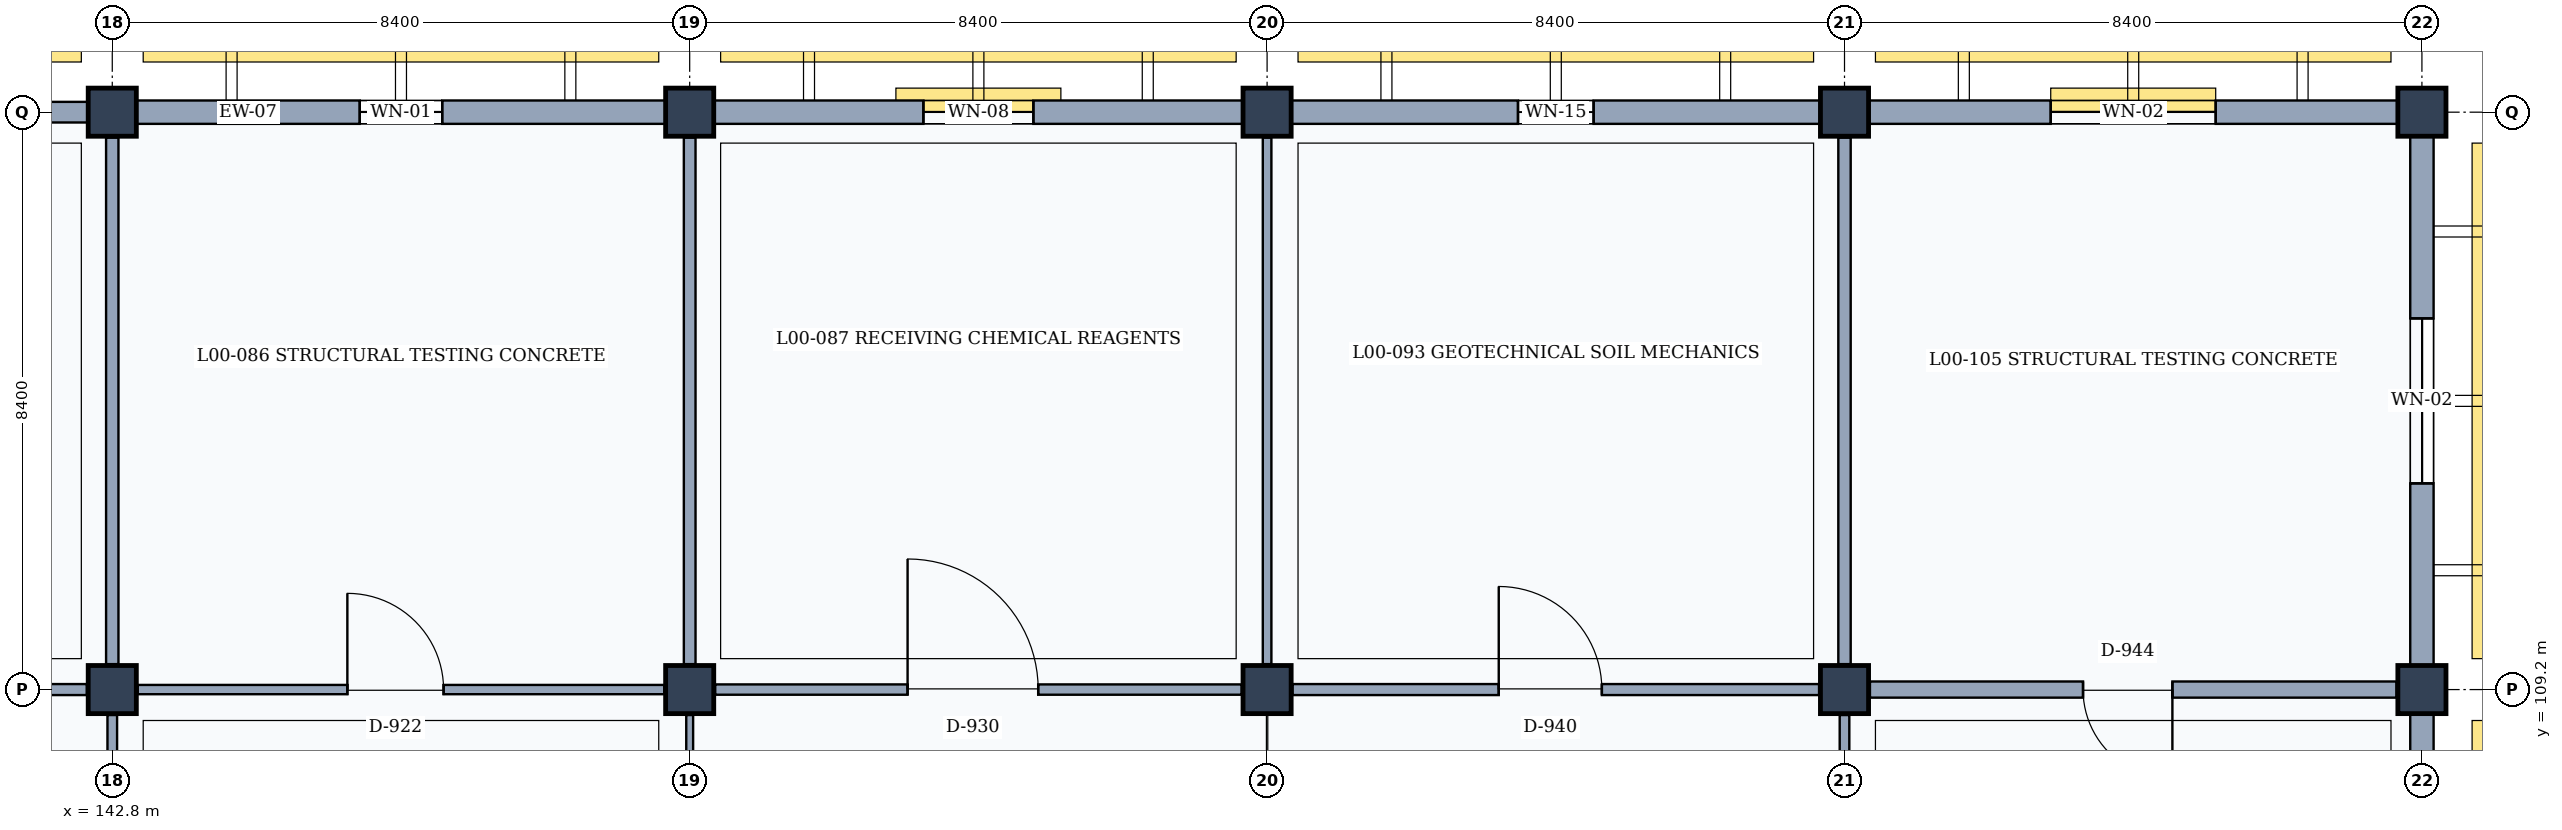
"""IFC4 building model, lengths in metres.
Left out: names, types, materials, properties, quantities, classifications, styles, units other than length and angle.
Written with IfcOpenShell. Run it as: python <this file> out.ifc"""

import sys

from ifc_helpers import new_model, si_unit, direction, frame, frame_2d, origin, origin_2d, place, context, subcontext, project, spatial, rectangle, extrude, element, fill, save


model = new_model("IFC4")
c1 = context("Model", 3, precision=1e-05, world=origin(), true_north=direction((0.0, 1.0)))
c2 = subcontext(c1, "Body", "Model", "MODEL_VIEW")
j1 = project(units=[si_unit("LENGTHUNIT", "METRE"), si_unit("PLANEANGLEUNIT", "RADIAN")], contexts=[c1])
p1 = place(None, origin())
s1 = spatial("IfcSite", under=j1, at=p1, CompositionType="ELEMENT")
p2 = place(p1, origin())
s2 = spatial("IfcBuilding", under=s1, at=p2, CompositionType="ELEMENT")
p3 = place(p2, origin())
s3 = spatial("IfcBuildingStorey", under=s2, at=p3, CompositionType="ELEMENT", Elevation=0.0)
for number, where, z_axis, x_axis in (
    (1, (142.8, 109.2, 0.0), (0.0, 0.0, 1.0), (1.0, 0.0, 0.0)),
    (2, (142.8, 117.6, 0.0), (0.0, 0.0, 1.0), (1.0, 0.0, 0.0)),
    (3, (151.2, 109.2, 0.0), (0.0, 0.0, 1.0), (1.0, 0.0, 0.0)),
    (4, (151.2, 117.6, 0.0), (0.0, 0.0, 1.0), (1.0, 0.0, 0.0)),
    (5, (159.6, 109.2, 0.0), (0.0, 0.0, 1.0), (1.0, 0.0, 0.0)),
    (6, (159.6, 117.6, 0.0), (0.0, 0.0, 1.0), (1.0, 0.0, 0.0)),
    (7, (168.0, 109.2, 0.0), (0.0, 0.0, 1.0), (1.0, 0.0, 0.0)),
    (8, (168.0, 117.6, 0.0), (0.0, 0.0, 1.0), (1.0, 0.0, 0.0)),
    (9, (176.4, 109.2, 0.0), (0.0, 0.0, 1.0), (1.0, 0.0, 0.0)),
    (10, (176.4, 117.6, 0.0), (0.0, 0.0, 1.0), (1.0, 0.0, 0.0)),
):
    element("IfcColumn", number, at=place(p3, frame(where, z_axis=z_axis, x_axis=x_axis)), inside=s3, PredefinedType="COLUMN", context=c2, shape_type="SweptSolid", body=[
        extrude(rectangle(XDim=0.7, YDim=0.7, at=origin_2d()), origin(), (0.0, 0.0, 1.0), 4.8),
    ])
p4 = place(p3, frame((134.7, 117.6, 0.0), z_axis=(0.0, 0.0, 1.0), x_axis=(1.0, 0.0, 0.0)))
e11 = element("IfcWall", 11, at=p4, inside=s3, PredefinedType="SOLIDWALL", context=c2, shape_type="SweptSolid", body=[
    extrude(rectangle(XDim=7.75, YDim=0.3, at=frame_2d((3.875, 0.0))), origin(), (0.0, 0.0, 1.0), 3.96),
])
p5 = place(p4, frame((2.375, 0.0, 0.95)))
e12 = element("IfcOpeningElement", 12, at=p5, cuts=e11, PredefinedType="OPENING", context=c2, shape_type="SweptSolid", body=[
    extrude(rectangle(XDim=3.0, YDim=1.8, at=frame_2d((1.5, 0.9))), frame((0.0, 0.16, 0.0), z_axis=(0.0, -1.0, 0.0), x_axis=(1.0, 0.0, 0.0)), (0.0, 0.0, 1.0), 0.32),
])
p6 = place(p3, frame((143.15, 117.6, 0.0), z_axis=(0.0, 0.0, 1.0), x_axis=(1.0, 0.0, 0.0)))
e13 = element("IfcWall", 13, at=p6, inside=s3, PredefinedType="SOLIDWALL", context=c2, shape_type="SweptSolid", body=[
    extrude(rectangle(XDim=7.7, YDim=0.34, at=frame_2d((3.85, 0.0))), origin(), (0.0, 0.0, 1.0), 3.96),
])
p7 = place(p6, frame((3.25, 0.0, 0.95)))
e14 = element("IfcOpeningElement", 14, at=p7, cuts=e13, PredefinedType="OPENING", context=c2, shape_type="SweptSolid", body=[
    extrude(rectangle(XDim=1.2, YDim=1.8, at=frame_2d((0.6, 0.9))), frame((0.0, 0.18, 0.0), z_axis=(0.0, -1.0, 0.0), x_axis=(1.0, 0.0, 0.0)), (0.0, 0.0, 1.0), 0.36),
])
p8 = place(p3, frame((151.55, 117.6, 0.0), z_axis=(0.0, 0.0, 1.0), x_axis=(1.0, 0.0, 0.0)))
e15 = element("IfcWall", 15, at=p8, inside=s3, PredefinedType="SOLIDWALL", context=c2, shape_type="SweptSolid", body=[
    extrude(rectangle(XDim=7.7, YDim=0.34, at=frame_2d((3.85, 0.0))), origin(), (0.0, 0.0, 1.0), 3.96),
])
p9 = place(p8, frame((3.05, 0.0, 0.95)))
e16 = element("IfcOpeningElement", 16, at=p9, cuts=e15, PredefinedType="OPENING", context=c2, shape_type="SweptSolid", body=[
    extrude(rectangle(XDim=1.6, YDim=2.0, at=frame_2d((0.8, 1.0))), frame((0.0, 0.18, 0.0), z_axis=(0.0, -1.0, 0.0), x_axis=(1.0, 0.0, 0.0)), (0.0, 0.0, 1.0), 0.36),
])
p10 = place(p3, frame((159.95, 117.6, 0.0), z_axis=(0.0, 0.0, 1.0), x_axis=(1.0, 0.0, 0.0)))
e17 = element("IfcWall", 17, at=p10, inside=s3, PredefinedType="SOLIDWALL", context=c2, shape_type="SweptSolid", body=[
    extrude(rectangle(XDim=7.7, YDim=0.34, at=frame_2d((3.85, 0.0))), origin(), (0.0, 0.0, 1.0), 3.96),
])
p11 = place(p10, frame((3.3, 0.0, 0.95)))
e18 = element("IfcOpeningElement", 18, at=p11, cuts=e17, PredefinedType="OPENING", context=c2, shape_type="SweptSolid", body=[
    extrude(rectangle(XDim=1.1, YDim=1.95, at=frame_2d((0.55, 0.975))), frame((0.0, 0.18, 0.0), z_axis=(0.0, -1.0, 0.0), x_axis=(1.0, 0.0, 0.0)), (0.0, 0.0, 1.0), 0.36),
])
p12 = place(p3, frame((176.4, 108.85, 0.0), z_axis=(0.0, 0.0, 1.0), x_axis=(0.0, -1.0, 0.0)))
e19 = element("IfcWall", 19, at=p12, inside=s3, PredefinedType="SOLIDWALL", context=c2, shape_type="SweptSolid", body=[
    extrude(rectangle(XDim=7.7, YDim=0.34, at=frame_2d((3.85, 0.0))), origin(), (0.0, 0.0, 1.0), 3.96),
])
p13 = place(p12, frame((3.25, 0.0, 0.95)))
e20 = element("IfcOpeningElement", 20, at=p13, cuts=e19, PredefinedType="OPENING", context=c2, shape_type="SweptSolid", body=[
    extrude(rectangle(XDim=1.2, YDim=1.8, at=frame_2d((0.6, 0.9))), frame((0.0, 0.18, 0.0), z_axis=(0.0, -1.0, 0.0), x_axis=(1.0, 0.0, 0.0)), (0.0, 0.0, 1.0), 0.36),
])
p14 = place(p3, frame((168.35, 117.6, 0.0), z_axis=(0.0, 0.0, 1.0), x_axis=(1.0, 0.0, 0.0)))
e21 = element("IfcWall", 21, at=p14, inside=s3, PredefinedType="SOLIDWALL", context=c2, shape_type="SweptSolid", body=[
    extrude(rectangle(XDim=7.7, YDim=0.34, at=frame_2d((3.85, 0.0))), origin(), (0.0, 0.0, 1.0), 3.96),
])
p15 = place(p14, frame((2.65, 0.0, 0.95)))
e22 = element("IfcOpeningElement", 22, at=p15, cuts=e21, PredefinedType="OPENING", context=c2, shape_type="SweptSolid", body=[
    extrude(rectangle(XDim=2.4, YDim=1.8, at=frame_2d((1.2, 0.9))), frame((0.0, 0.18, 0.0), z_axis=(0.0, -1.0, 0.0), x_axis=(1.0, 0.0, 0.0)), (0.0, 0.0, 1.0), 0.36),
])
p16 = place(p3, frame((176.4, 117.25, 0.0), z_axis=(0.0, 0.0, 1.0), x_axis=(0.0, -1.0, 0.0)))
e23 = element("IfcWall", 23, at=p16, inside=s3, PredefinedType="SOLIDWALL", context=c2, shape_type="SweptSolid", body=[
    extrude(rectangle(XDim=7.7, YDim=0.34, at=frame_2d((3.85, 0.0))), origin(), (0.0, 0.0, 1.0), 3.96),
])
p17 = place(p16, frame((2.65, 0.0, 0.95)))
e24 = element("IfcOpeningElement", 24, at=p17, cuts=e23, PredefinedType="OPENING", context=c2, shape_type="SweptSolid", body=[
    extrude(rectangle(XDim=2.4, YDim=1.8, at=frame_2d((1.2, 0.9))), frame((0.0, 0.18, 0.0), z_axis=(0.0, -1.0, 0.0), x_axis=(1.0, 0.0, 0.0)), (0.0, 0.0, 1.0), 0.36),
])
p18 = place(p3, frame((142.8, 101.17, 0.0), z_axis=(0.0, 0.0, 1.0), x_axis=(0.0, 1.0, 0.0)))
e25 = element("IfcWall", 25, at=p18, inside=s3, PredefinedType="PARTITIONING", context=c2, shape_type="SweptSolid", body=[
    extrude(rectangle(XDim=7.66, YDim=0.14, at=frame_2d((3.83, 0.0))), origin(), (0.0, 0.0, 1.0), 3.92),
])
p19 = place(p3, frame((134.72, 109.2, 0.0), z_axis=(0.0, 0.0, 1.0), x_axis=(1.0, 0.0, 0.0)))
e26 = element("IfcWall", 26, at=p19, inside=s3, PredefinedType="PARTITIONING", context=c2, shape_type="SweptSolid", body=[
    extrude(rectangle(XDim=7.71, YDim=0.16, at=frame_2d((3.855, 0.0))), origin(), (0.0, 0.0, 1.0), 3.86),
])
p20 = place(p19, frame((2.8, 0.0, 0.0)))
e27 = element("IfcOpeningElement", 27, at=p20, cuts=e26, PredefinedType="OPENING", context=c2, shape_type="SweptSolid", body=[
    extrude(rectangle(XDim=1.9, YDim=2.4, at=frame_2d((0.95, 1.2))), frame((0.0, 0.09, 0.0), z_axis=(0.0, -1.0, 0.0), x_axis=(1.0, 0.0, 0.0)), (0.0, 0.0, 1.0), 0.18),
])
p21 = place(p3, frame((142.8, 109.57, 0.0), z_axis=(0.0, 0.0, 1.0), x_axis=(0.0, 1.0, 0.0)))
e28 = element("IfcWall", 28, at=p21, inside=s3, PredefinedType="PARTITIONING", context=c2, shape_type="SweptSolid", body=[
    extrude(rectangle(XDim=7.66, YDim=0.18, at=frame_2d((3.83, 0.0))), origin(), (0.0, 0.0, 1.0), 3.92),
])
p22 = place(p3, frame((151.2, 101.245, 0.0), z_axis=(0.0, 0.0, 1.0), x_axis=(0.0, 1.0, 0.0)))
e29 = element("IfcWall", 29, at=p22, inside=s3, PredefinedType="MOVABLE", context=c2, shape_type="SweptSolid", body=[
    extrude(rectangle(XDim=7.585, YDim=0.1, at=frame_2d((3.792, 0.0))), origin(), (0.0, 0.0, 1.0), 3.92),
])
p23 = place(p22, frame((3.15, 0.0, 0.0)))
e30 = element("IfcOpeningElement", 30, at=p23, cuts=e29, PredefinedType="OPENING", context=c2, shape_type="SweptSolid", body=[
    extrude(rectangle(XDim=1.2, YDim=2.2, at=frame_2d((0.6, 1.1))), frame((0.0, 0.06, 0.0), z_axis=(0.0, -1.0, 0.0), x_axis=(1.0, 0.0, 0.0)), (0.0, 0.0, 1.0), 0.12),
])
p24 = place(p3, frame((143.17, 109.2, 0.0), z_axis=(0.0, 0.0, 1.0), x_axis=(1.0, 0.0, 0.0)))
e31 = element("IfcWall", 31, at=p24, inside=s3, PredefinedType="PARTITIONING", context=c2, shape_type="SweptSolid", body=[
    extrude(rectangle(XDim=7.66, YDim=0.135, at=frame_2d((3.83, 0.0))), origin(), (0.0, 0.0, 1.0), 3.87),
])
p25 = place(p24, frame((3.05, 0.0, 0.0)))
e32 = element("IfcOpeningElement", 32, at=p25, cuts=e31, PredefinedType="OPENING", context=c2, shape_type="SweptSolid", body=[
    extrude(rectangle(XDim=1.4, YDim=2.25, at=frame_2d((0.7, 1.125))), frame((0.0, 0.077, 0.0), z_axis=(0.0, -1.0, 0.0), x_axis=(1.0, 0.0, 0.0)), (0.0, 0.0, 1.0), 0.155),
])
p26 = place(p3, frame((151.2, 109.57, 0.0), z_axis=(0.0, 0.0, 1.0), x_axis=(0.0, 1.0, 0.0)))
e33 = element("IfcWall", 33, at=p26, inside=s3, PredefinedType="PARTITIONING", context=c2, shape_type="SweptSolid", body=[
    extrude(rectangle(XDim=7.66, YDim=0.17, at=frame_2d((3.83, 0.0))), origin(), (0.0, 0.0, 1.0), 3.92),
])
p27 = place(p3, frame((151.57, 109.2, 0.0), z_axis=(0.0, 0.0, 1.0), x_axis=(1.0, 0.0, 0.0)))
e34 = element("IfcWall", 34, at=p27, inside=s3, PredefinedType="PARTITIONING", context=c2, shape_type="SweptSolid", body=[
    extrude(rectangle(XDim=7.66, YDim=0.15, at=frame_2d((3.83, 0.0))), origin(), (0.0, 0.0, 1.0), 3.87),
])
p28 = place(p27, frame((2.8, 0.0, 0.0)))
e35 = element("IfcOpeningElement", 35, at=p28, cuts=e34, PredefinedType="OPENING", context=c2, shape_type="SweptSolid", body=[
    extrude(rectangle(XDim=1.9, YDim=2.4, at=frame_2d((0.95, 1.2))), frame((0.0, 0.085, 0.0), z_axis=(0.0, -1.0, 0.0), x_axis=(1.0, 0.0, 0.0)), (0.0, 0.0, 1.0), 0.17),
])
p29 = place(p3, frame((159.6, 109.57, 0.0), z_axis=(0.0, 0.0, 1.0), x_axis=(0.0, 1.0, 0.0)))
e36 = element("IfcWall", 36, at=p29, inside=s3, PredefinedType="PARTITIONING", context=c2, shape_type="SweptSolid", body=[
    extrude(rectangle(XDim=7.66, YDim=0.125, at=frame_2d((3.83, 0.0))), origin(), (0.0, 0.0, 1.0), 3.92),
])
p30 = place(p3, frame((168.0, 101.17, 0.0), z_axis=(0.0, 0.0, 1.0), x_axis=(0.0, 1.0, 0.0)))
e37 = element("IfcWall", 37, at=p30, inside=s3, PredefinedType="PARTITIONING", context=c2, shape_type="SweptSolid", body=[
    extrude(rectangle(XDim=7.66, YDim=0.14, at=frame_2d((3.83, 0.0))), origin(), (0.0, 0.0, 1.0), 3.92),
])
p31 = place(p30, frame((3.05, 0.0, 0.0)))
e38 = element("IfcOpeningElement", 38, at=p31, cuts=e37, PredefinedType="OPENING", context=c2, shape_type="SweptSolid", body=[
    extrude(rectangle(XDim=1.4, YDim=2.25, at=frame_2d((0.7, 1.125))), frame((0.0, 0.08, 0.0), z_axis=(0.0, -1.0, 0.0), x_axis=(1.0, 0.0, 0.0)), (0.0, 0.0, 1.0), 0.16),
])
p32 = place(p3, frame((159.97, 109.2, 0.0), z_axis=(0.0, 0.0, 1.0), x_axis=(1.0, 0.0, 0.0)))
e39 = element("IfcWall", 39, at=p32, inside=s3, PredefinedType="PARTITIONING", context=c2, shape_type="SweptSolid", body=[
    extrude(rectangle(XDim=7.66, YDim=0.16, at=frame_2d((3.83, 0.0))), origin(), (0.0, 0.0, 1.0), 3.87),
])
p33 = place(p32, frame((3.0, 0.0, 0.0)))
e40 = element("IfcOpeningElement", 40, at=p33, cuts=e39, PredefinedType="OPENING", context=c2, shape_type="SweptSolid", body=[
    extrude(rectangle(XDim=1.5, YDim=2.3, at=frame_2d((0.75, 1.15))), frame((0.0, 0.09, 0.0), z_axis=(0.0, -1.0, 0.0), x_axis=(1.0, 0.0, 0.0)), (0.0, 0.0, 1.0), 0.18),
])
p34 = place(p3, frame((168.0, 109.57, 0.0), z_axis=(0.0, 0.0, 1.0), x_axis=(0.0, 1.0, 0.0)))
e41 = element("IfcWall", 41, at=p34, inside=s3, PredefinedType="PARTITIONING", context=c2, shape_type="SweptSolid", body=[
    extrude(rectangle(XDim=7.66, YDim=0.18, at=frame_2d((3.83, 0.0))), origin(), (0.0, 0.0, 1.0), 3.92),
])
p35 = place(p3, frame((168.37, 109.2, 0.0), z_axis=(0.0, 0.0, 1.0), x_axis=(1.0, 0.0, 0.0)))
e42 = element("IfcWall", 42, at=p35, inside=s3, PredefinedType="PARTITIONING", context=c2, shape_type="SweptSolid", body=[
    extrude(rectangle(XDim=7.66, YDim=0.235, at=frame_2d((3.83, 0.0))), origin(), (0.0, 0.0, 1.0), 3.87),
])
p36 = place(p35, frame((3.1, 0.0, 0.0)))
e43 = element("IfcOpeningElement", 43, at=p36, cuts=e42, PredefinedType="OPENING", context=c2, shape_type="SweptSolid", body=[
    extrude(rectangle(XDim=1.3, YDim=2.2, at=frame_2d((0.65, 1.1))), frame((0.0, 0.127, 0.0), z_axis=(0.0, -1.0, 0.0), x_axis=(1.0, 0.0, 0.0)), (0.0, 0.0, 1.0), 0.255),
])
p37 = place(p7, origin())
e44 = element("IfcWindow", 44, at=p37, inside=s3, PartitioningType="SINGLE_PANEL", PredefinedType="WINDOW", context=c2, shape_type="SweptSolid", body=[
    extrude(rectangle(XDim=1.2, YDim=1.8, at=frame_2d((0.6, 0.9))), frame((0.0, 0.03, 0.0), z_axis=(0.0, -1.0, 0.0), x_axis=(1.0, 0.0, 0.0)), (0.0, 0.0, 1.0), 0.06),
])
fill(e14, e44)
p38 = place(p9, origin())
e45 = element("IfcWindow", 45, at=p38, inside=s3, PartitioningType="SINGLE_PANEL", PredefinedType="WINDOW", context=c2, shape_type="SweptSolid", body=[
    extrude(rectangle(XDim=1.6, YDim=2.0, at=frame_2d((0.8, 1.0))), frame((0.0, 0.03, 0.0), z_axis=(0.0, -1.0, 0.0), x_axis=(1.0, 0.0, 0.0)), (0.0, 0.0, 1.0), 0.06),
])
fill(e16, e45)
p39 = place(p11, origin())
e46 = element("IfcWindow", 46, at=p39, inside=s3, PartitioningType="SINGLE_PANEL", PredefinedType="WINDOW", context=c2, shape_type="SweptSolid", body=[
    extrude(rectangle(XDim=1.1, YDim=1.95, at=frame_2d((0.55, 0.975))), frame((0.0, 0.03, 0.0), z_axis=(0.0, -1.0, 0.0), x_axis=(1.0, 0.0, 0.0)), (0.0, 0.0, 1.0), 0.06),
])
fill(e18, e46)
p40 = place(p15, origin())
e47 = element("IfcWindow", 47, at=p40, inside=s3, PartitioningType="SINGLE_PANEL", PredefinedType="WINDOW", context=c2, shape_type="SweptSolid", body=[
    extrude(rectangle(XDim=2.4, YDim=1.8, at=frame_2d((1.2, 0.9))), frame((0.0, 0.03, 0.0), z_axis=(0.0, -1.0, 0.0), x_axis=(1.0, 0.0, 0.0)), (0.0, 0.0, 1.0), 0.06),
])
fill(e22, e47)
p41 = place(p17, origin())
e48 = element("IfcWindow", 48, at=p41, inside=s3, PartitioningType="SINGLE_PANEL", PredefinedType="WINDOW", context=c2, shape_type="SweptSolid", body=[
    extrude(rectangle(XDim=2.4, YDim=1.8, at=frame_2d((1.2, 0.9))), frame((0.0, 0.03, 0.0), z_axis=(0.0, -1.0, 0.0), x_axis=(1.0, 0.0, 0.0)), (0.0, 0.0, 1.0), 0.06),
])
fill(e24, e48)
p42 = place(p25, origin())
e49 = element("IfcDoor", 49, at=p42, inside=s3, OperationType="SINGLE_SWING_LEFT", PredefinedType="DOOR", context=c2, shape_type="SweptSolid", body=[
    extrude(rectangle(XDim=1.4, YDim=2.25, at=frame_2d((0.7, 1.125))), frame((0.0, 0.025, 0.0), z_axis=(0.0, -1.0, 0.0), x_axis=(1.0, 0.0, 0.0)), (0.0, 0.0, 1.0), 0.05),
])
fill(e32, e49)
p43 = place(p28, origin())
e50 = element("IfcDoor", 50, at=p43, inside=s3, OperationType="SINGLE_SWING_LEFT", PredefinedType="DOOR", context=c2, shape_type="SweptSolid", body=[
    extrude(rectangle(XDim=1.9, YDim=2.4, at=frame_2d((0.95, 1.2))), frame((0.0, 0.025, 0.0), z_axis=(0.0, -1.0, 0.0), x_axis=(1.0, 0.0, 0.0)), (0.0, 0.0, 1.0), 0.05),
])
fill(e35, e50)
p44 = place(p33, origin())
e51 = element("IfcDoor", 51, at=p44, inside=s3, OperationType="SINGLE_SWING_LEFT", PredefinedType="DOOR", context=c2, shape_type="SweptSolid", body=[
    extrude(rectangle(XDim=1.5, YDim=2.3, at=frame_2d((0.75, 1.15))), frame((0.0, 0.025, 0.0), z_axis=(0.0, -1.0, 0.0), x_axis=(1.0, 0.0, 0.0)), (0.0, 0.0, 1.0), 0.05),
])
fill(e40, e51)
p45 = place(p36, frame((1.3, 0.0, 0.0), z_axis=(0.0, 0.0, 1.0), x_axis=(-1.0, 0.0, 0.0)))
e52 = element("IfcDoor", 52, at=p45, inside=s3, OperationType="SINGLE_SWING_LEFT", PredefinedType="DOOR", context=c2, shape_type="SweptSolid", body=[
    extrude(rectangle(XDim=1.3, YDim=2.2, at=frame_2d((0.65, 1.1))), frame((0.0, 0.025, 0.0), z_axis=(0.0, -1.0, 0.0), x_axis=(1.0, 0.0, 0.0)), (0.0, 0.0, 1.0), 0.05),
])
fill(e43, e52)
save(model, sys.argv[1])
